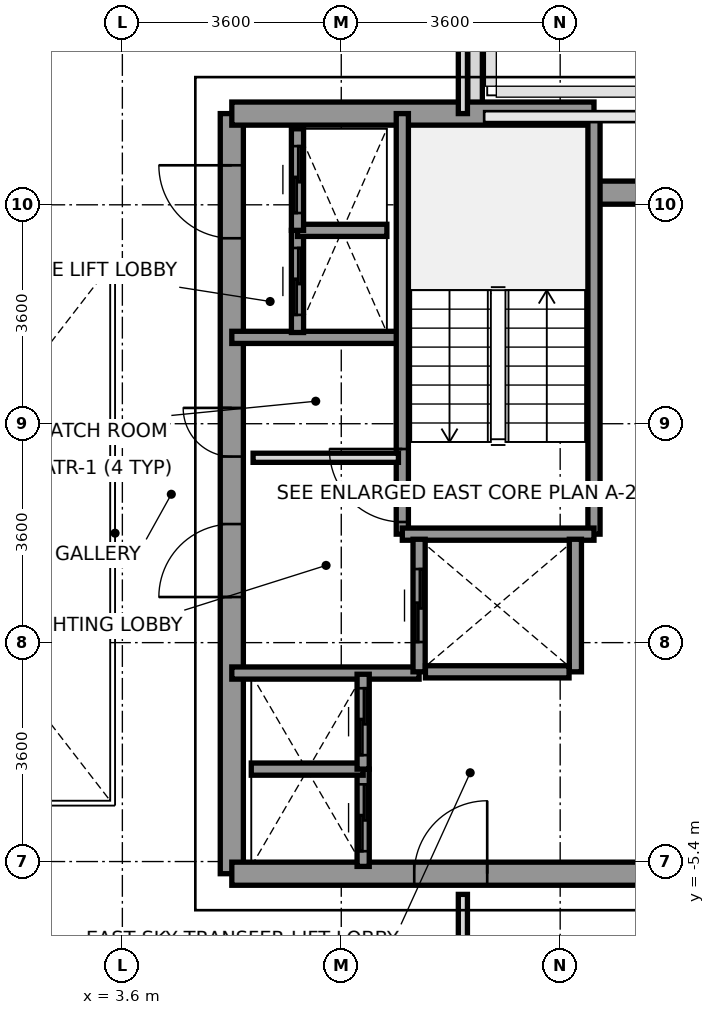
"""IFC4 building model, lengths in metres.
Left out: names, types, materials, properties, quantities, classifications, styles, units other than length and angle.
Written with IfcOpenShell. Run it as: python <this file> out.ifc"""

import sys

from ifc_helpers import new_model, si_unit, direction, frame, frame_2d, origin, place, context, subcontext, project, spatial, rectangle, extrude, source, transform, mapped, element, fill, save


model = new_model("IFC4")
c1 = context("Model", 3, precision=1e-05, world=origin(), true_north=direction((0.0, 1.0)))
c2 = subcontext(c1, "Body", "Model", "MODEL_VIEW")
j1 = project(units=[si_unit("LENGTHUNIT", "METRE"), si_unit("PLANEANGLEUNIT", "RADIAN")], contexts=[c1])
p1 = place(None, origin())
s1 = spatial("IfcSite", under=j1, at=p1, CompositionType="ELEMENT")
p2 = place(p1, origin())
s2 = spatial("IfcBuilding", under=s1, at=p2, CompositionType="ELEMENT")
p3 = place(p2, frame((0.0, 0.0, 177.4)))
s3 = spatial("IfcBuildingStorey", under=s2, at=p3, CompositionType="ELEMENT", Elevation=177.4)
p4 = place(p3, frame((9.4, 8.547, 0.0), z_axis=(0.0, 0.0, 1.0), x_axis=(0.0, -1.0, 0.0)))
e1 = element("IfcWall", 1, at=p4, inside=s3, PredefinedType="PARAPET", context=c2, shape_type="SweptSolid", body=[
    extrude(rectangle(XDim=1.594, YDim=0.24, at=frame_2d((0.797, 0.0))), origin(), (0.0, 0.0, 1.0), 1.15),
])
p5 = place(p3, frame((5.4, -5.6, 0.0), z_axis=(0.0, 0.0, 1.0), x_axis=(0.0, 1.0, 0.0)))
e2 = element("IfcWall", 2, at=p5, inside=s3, PredefinedType="SHEAR", context=c2, shape_type="SweptSolid", body=[
    extrude(rectangle(XDim=12.5, YDim=0.38, at=frame_2d((6.25, 0.0))), origin(), (0.0, 0.0, 1.0), 3.2),
])
p6 = place(p5, frame((4.55, 0.0, 0.0)))
e3 = element("IfcOpeningElement", 3, at=p6, cuts=e2, PredefinedType="OPENING", context=c2, shape_type="SweptSolid", body=[
    extrude(rectangle(XDim=1.2, YDim=2.2, at=frame_2d((0.6, 1.1))), frame((0.0, 0.2, 0.0), z_axis=(0.0, -1.0, 0.0), x_axis=(1.0, 0.0, 0.0)), (0.0, 0.0, 1.0), 0.4),
])
p7 = place(p5, frame((10.45, 0.0, 0.0)))
e4 = element("IfcOpeningElement", 4, at=p7, cuts=e2, PredefinedType="OPENING", context=c2, shape_type="SweptSolid", body=[
    extrude(rectangle(XDim=1.2, YDim=2.2, at=frame_2d((0.6, 1.1))), frame((0.0, 0.2, 0.0), z_axis=(0.0, -1.0, 0.0), x_axis=(1.0, 0.0, 0.0)), (0.0, 0.0, 1.0), 0.4),
])
p8 = place(p5, frame((6.86, 0.0, 0.0)))
e5 = element("IfcOpeningElement", 5, at=p8, cuts=e2, PredefinedType="OPENING", context=c2, shape_type="SweptSolid", body=[
    extrude(rectangle(XDim=0.8, YDim=2.1, at=frame_2d((0.4, 1.05))), frame((0.0, 0.2, 0.0), z_axis=(0.0, -1.0, 0.0), x_axis=(1.0, 0.0, 0.0)), (0.0, 0.0, 1.0), 0.4),
])
p9 = place(p3, frame((5.4, 6.9, 0.0), z_axis=(0.0, 0.0, 1.0), x_axis=(1.0, 0.0, 0.0)))
e6 = element("IfcWall", 6, at=p9, inside=s3, PredefinedType="SHEAR", context=c2, shape_type="SweptSolid", body=[
    extrude(rectangle(XDim=5.956, YDim=0.38, at=frame_2d((2.978, 0.0))), origin(), (0.0, 0.0, 1.0), 3.2),
])
p10 = place(p3, frame((11.356, 5.6, 0.0), z_axis=(0.0, 0.0, 1.0), x_axis=(1.0, 0.0, 0.0)))
e7 = element("IfcWall", 7, at=p10, inside=s3, PredefinedType="SHEAR", context=c2, shape_type="SweptSolid", body=[
    extrude(rectangle(XDim=1.844, YDim=0.38, at=frame_2d((0.922, 0.0))), origin(), (0.0, 0.0, 1.0), 3.2),
])
p11 = place(p3, frame((5.4, -5.6, 0.0), z_axis=(0.0, 0.0, 1.0), x_axis=(1.0, 0.0, 0.0)))
e8 = element("IfcWall", 8, at=p11, inside=s3, PredefinedType="SHEAR", context=c2, shape_type="SweptSolid", body=[
    extrude(rectangle(XDim=7.8, YDim=0.38, at=frame_2d((3.9, 0.0))), origin(), (0.0, 0.0, 1.0), 3.2),
])
p12 = place(p11, frame((3.0, 0.0, 0.0)))
e9 = element("IfcOpeningElement", 9, at=p12, cuts=e8, PredefinedType="OPENING", context=c2, shape_type="SweptSolid", body=[
    extrude(rectangle(XDim=1.2, YDim=2.2, at=frame_2d((0.6, 1.1))), frame((0.0, 0.2, 0.0), z_axis=(0.0, -1.0, 0.0), x_axis=(1.0, 0.0, 0.0)), (0.0, 0.0, 1.0), 0.4),
])
p13 = place(p3, frame((5.4, 3.22, 0.0), z_axis=(0.0, 0.0, 1.0), x_axis=(1.0, 0.0, 0.0)))
e10 = element("IfcWall", 10, at=p13, inside=s3, PredefinedType="SOLIDWALL", context=c2, shape_type="SweptSolid", body=[
    extrude(rectangle(XDim=2.78, YDim=0.2, at=frame_2d((1.39, 0.0))), origin(), (0.0, 0.0, 1.0), 3.2),
])
p14 = place(p3, frame((5.4, -2.3, 0.0), z_axis=(0.0, 0.0, 1.0), x_axis=(1.0, 0.0, 0.0)))
e11 = element("IfcWall", 11, at=p14, inside=s3, PredefinedType="SOLIDWALL", context=c2, shape_type="SweptSolid", body=[
    extrude(rectangle(XDim=3.08, YDim=0.2, at=frame_2d((1.54, 0.0))), origin(), (0.0, 0.0, 1.0), 3.2),
])
p15 = place(p3, frame((8.204, -0.016, 0.0), z_axis=(0.0, 0.0, 1.0), x_axis=(0.0, 1.0, 0.0)))
e12 = element("IfcWall", 12, at=p15, inside=s3, PredefinedType="SOLIDWALL", context=c2, shape_type="SweptSolid", body=[
    extrude(rectangle(XDim=6.916, YDim=0.2, at=frame_2d((3.458, 0.0))), origin(), (0.0, 0.0, 1.0), 3.2),
])
p16 = place(p15, frame((0.2, 0.0, 0.0)))
e13 = element("IfcOpeningElement", 13, at=p16, cuts=e12, PredefinedType="OPENING", context=c2, shape_type="SweptSolid", body=[
    extrude(rectangle(XDim=1.2, YDim=2.2, at=frame_2d((0.6, 1.1))), frame((0.0, 0.11, 0.0), z_axis=(0.0, -1.0, 0.0), x_axis=(1.0, 0.0, 0.0)), (0.0, 0.0, 1.0), 0.22),
])
p17 = place(p3, frame((11.356, -0.016, 0.0), z_axis=(0.0, 0.0, 1.0), x_axis=(0.0, 1.0, 0.0)))
e14 = element("IfcWall", 14, at=p17, inside=s3, PredefinedType="SOLIDWALL", context=c2, shape_type="SweptSolid", body=[
    extrude(rectangle(XDim=6.916, YDim=0.2, at=frame_2d((3.458, 0.0))), origin(), (0.0, 0.0, 1.0), 3.2),
])
p18 = place(p3, frame((8.204, -0.016, 0.0), z_axis=(0.0, 0.0, 1.0), x_axis=(1.0, 0.0, 0.0)))
e15 = element("IfcWall", 15, at=p18, inside=s3, PredefinedType="SOLIDWALL", context=c2, shape_type="SweptSolid", body=[
    extrude(rectangle(XDim=3.152, YDim=0.2, at=frame_2d((1.576, 0.0))), origin(), (0.0, 0.0, 1.0), 3.2),
])
p19 = place(p3, frame((8.48, -2.28, 0.0), z_axis=(0.0, 0.0, 1.0), x_axis=(0.0, 1.0, 0.0)))
e16 = element("IfcWall", 16, at=p19, inside=s3, PredefinedType="SOLIDWALL", context=c2, shape_type="SweptSolid", body=[
    extrude(rectangle(XDim=2.18, YDim=0.2, at=frame_2d((1.09, 0.0))), origin(), (0.0, 0.0, 1.0), 3.2),
])
p20 = place(p19, frame((0.49, 0.0, 0.0)))
e17 = element("IfcOpeningElement", 17, at=p20, cuts=e16, PredefinedType="OPENING", context=c2, shape_type="SweptSolid", body=[
    extrude(rectangle(XDim=1.2, YDim=2.2, at=frame_2d((0.6, 1.1))), frame((0.0, 0.11, 0.0), z_axis=(0.0, -1.0, 0.0), x_axis=(1.0, 0.0, 0.0)), (0.0, 0.0, 1.0), 0.22),
])
p21 = place(p3, frame((11.05, -2.28, 0.0), z_axis=(0.0, 0.0, 1.0), x_axis=(0.0, 1.0, 0.0)))
e18 = element("IfcWall", 18, at=p21, inside=s3, PredefinedType="SOLIDWALL", context=c2, shape_type="SweptSolid", body=[
    extrude(rectangle(XDim=2.18, YDim=0.2, at=frame_2d((1.09, 0.0))), origin(), (0.0, 0.0, 1.0), 3.2),
])
p22 = place(p3, frame((8.584, -2.28, 0.0), z_axis=(0.0, 0.0, 1.0), x_axis=(1.0, 0.0, 0.0)))
e19 = element("IfcWall", 19, at=p22, inside=s3, PredefinedType="SOLIDWALL", context=c2, shape_type="SweptSolid", body=[
    extrude(rectangle(XDim=2.362, YDim=0.2, at=frame_2d((1.181, 0.0))), origin(), (0.0, 0.0, 1.0), 3.2),
])
p23 = place(p3, frame((7.56, -5.48, 0.0), z_axis=(0.0, 0.0, 1.0), x_axis=(0.0, 1.0, 0.0)))
e20 = element("IfcWall", 20, at=p23, inside=s3, PredefinedType="SOLIDWALL", context=c2, shape_type="SweptSolid", body=[
    extrude(rectangle(XDim=1.6, YDim=0.2, at=frame_2d((0.8, 0.0))), origin(), (0.0, 0.0, 1.0), 3.2),
])
p24 = place(p23, frame((0.25, 0.0, 0.0)))
e21 = element("IfcOpeningElement", 21, at=p24, cuts=e20, PredefinedType="OPENING", context=c2, shape_type="SweptSolid", body=[
    extrude(rectangle(XDim=1.1, YDim=2.2, at=frame_2d((0.55, 1.1))), frame((0.0, 0.11, 0.0), z_axis=(0.0, -1.0, 0.0), x_axis=(1.0, 0.0, 0.0)), (0.0, 0.0, 1.0), 0.22),
])
p25 = place(p3, frame((5.72, -3.88, 0.0), z_axis=(0.0, 0.0, 1.0), x_axis=(1.0, 0.0, 0.0)))
e22 = element("IfcWall", 22, at=p25, inside=s3, PredefinedType="SOLIDWALL", context=c2, shape_type="SweptSolid", body=[
    extrude(rectangle(XDim=1.84, YDim=0.2, at=frame_2d((0.92, 0.0))), origin(), (0.0, 0.0, 1.0), 3.2),
])
p26 = place(p3, frame((7.56, -3.88, 0.0), z_axis=(0.0, 0.0, 1.0), x_axis=(0.0, 1.0, 0.0)))
e23 = element("IfcWall", 23, at=p26, inside=s3, PredefinedType="SOLIDWALL", context=c2, shape_type="SweptSolid", body=[
    extrude(rectangle(XDim=1.56, YDim=0.2, at=frame_2d((0.78, 0.0))), origin(), (0.0, 0.0, 1.0), 3.2),
])
p27 = place(p26, frame((0.23, 0.0, 0.0)))
e24 = element("IfcOpeningElement", 24, at=p27, cuts=e23, PredefinedType="OPENING", context=c2, shape_type="SweptSolid", body=[
    extrude(rectangle(XDim=1.1, YDim=2.2, at=frame_2d((0.55, 1.1))), frame((0.0, 0.11, 0.0), z_axis=(0.0, -1.0, 0.0), x_axis=(1.0, 0.0, 0.0)), (0.0, 0.0, 1.0), 0.22),
])
p28 = place(p3, frame((6.48, 3.3, 0.0), z_axis=(0.0, 0.0, 1.0), x_axis=(0.0, 1.0, 0.0)))
e25 = element("IfcWall", 25, at=p28, inside=s3, PredefinedType="SOLIDWALL", context=c2, shape_type="SweptSolid", body=[
    extrude(rectangle(XDim=1.68, YDim=0.2, at=frame_2d((0.84, 0.0))), origin(), (0.0, 0.0, 1.0), 3.2),
])
p29 = place(p28, frame((0.29, 0.0, 0.0)))
e26 = element("IfcOpeningElement", 26, at=p29, cuts=e25, PredefinedType="OPENING", context=c2, shape_type="SweptSolid", body=[
    extrude(rectangle(XDim=1.1, YDim=2.2, at=frame_2d((0.55, 1.1))), frame((0.0, 0.11, 0.0), z_axis=(0.0, -1.0, 0.0), x_axis=(1.0, 0.0, 0.0)), (0.0, 0.0, 1.0), 0.22),
])
p30 = place(p3, frame((6.48, 4.98, 0.0), z_axis=(0.0, 0.0, 1.0), x_axis=(1.0, 0.0, 0.0)))
e27 = element("IfcWall", 27, at=p30, inside=s3, PredefinedType="SOLIDWALL", context=c2, shape_type="SweptSolid", body=[
    extrude(rectangle(XDim=1.47, YDim=0.2, at=frame_2d((0.735, 0.0))), origin(), (0.0, 0.0, 1.0), 3.2),
])
p31 = place(p3, frame((6.48, 4.98, 0.0), z_axis=(0.0, 0.0, 1.0), x_axis=(0.0, 1.0, 0.0)))
e28 = element("IfcWall", 28, at=p31, inside=s3, PredefinedType="SOLIDWALL", context=c2, shape_type="SweptSolid", body=[
    extrude(rectangle(XDim=1.67, YDim=0.2, at=frame_2d((0.835, 0.0))), origin(), (0.0, 0.0, 1.0), 3.2),
])
p32 = place(p31, frame((0.285, 0.0, 0.0)))
e29 = element("IfcOpeningElement", 29, at=p32, cuts=e28, PredefinedType="OPENING", context=c2, shape_type="SweptSolid", body=[
    extrude(rectangle(XDim=1.1, YDim=2.2, at=frame_2d((0.55, 1.1))), frame((0.0, 0.11, 0.0), z_axis=(0.0, -1.0, 0.0), x_axis=(1.0, 0.0, 0.0)), (0.0, 0.0, 1.0), 0.22),
])
p33 = place(p3, frame((5.75, 1.24, 0.0), z_axis=(0.0, 0.0, 1.0), x_axis=(1.0, 0.0, 0.0)))
e30 = element("IfcWall", 30, at=p33, inside=s3, PredefinedType="PARTITIONING", context=c2, shape_type="SweptSolid", body=[
    extrude(rectangle(XDim=2.39, YDim=0.15, at=frame_2d((1.195, 0.0))), origin(), (0.0, 0.0, 1.0), 2.3),
])
p34 = place(p3, frame((9.2, 6.9, 0.0), z_axis=(0.0, 0.0, 1.0), x_axis=(0.0, 1.0, 0.0)))
e31 = element("IfcWall", 31, at=p34, inside=s3, PredefinedType="PARTITIONING", context=c2, shape_type="SweptSolid", body=[
    extrude(rectangle(XDim=8.78, YDim=0.15, at=frame_2d((4.39, 0.0))), origin(), (0.0, 0.0, 1.0), 2.75),
])
p35 = place(p3, frame((9.2, -15.68, 0.0), z_axis=(0.0, 0.0, 1.0), x_axis=(0.0, 1.0, 0.0)))
e32 = element("IfcWall", 32, at=p35, inside=s3, PredefinedType="PARTITIONING", context=c2, shape_type="SweptSolid", body=[
    extrude(rectangle(XDim=9.74, YDim=0.15, at=frame_2d((4.87, 0.0))), origin(), (0.0, 0.0, 1.0), 2.75),
])
m1 = source(origin(), c2, "Body", "SweptSolid", [
    extrude(rectangle(XDim=1.2, YDim=2.2, at=frame_2d((0.6, 1.1))), frame((0.0, 0.025, 0.0), z_axis=(0.0, -1.0, 0.0), x_axis=(1.0, 0.0, 0.0)), (0.0, 0.0, 1.0), 0.05),
])
p36 = place(p16, origin())
e33 = element("IfcDoor", 33, at=p36, inside=s3, OperationType="SINGLE_SWING_RIGHT", PredefinedType="DOOR", context=c2, shape_type="MappedRepresentation", body=[
    mapped(m1, transform((0.0, 0.0, 0.0), x_axis=(1.0, 0.0, 0.0), y_axis=(0.0, 1.0, 0.0), z_axis=(0.0, 0.0, 1.0), scale=1.0)),
])
fill(e13, e33)
p37 = place(p6, origin())
e34 = element("IfcDoor", 34, at=p37, inside=s3, OperationType="SINGLE_SWING_LEFT", PredefinedType="DOOR", context=c2, shape_type="MappedRepresentation", body=[
    mapped(m1, transform((0.0, 0.0, 0.0), x_axis=(1.0, 0.0, 0.0), y_axis=(0.0, 1.0, 0.0), z_axis=(0.0, 0.0, 1.0), scale=1.0)),
])
fill(e3, e34)
p38 = place(p7, origin())
e35 = element("IfcDoor", 35, at=p38, inside=s3, OperationType="SINGLE_SWING_RIGHT", PredefinedType="DOOR", context=c2, shape_type="MappedRepresentation", body=[
    mapped(m1, transform((0.0, 0.0, 0.0), x_axis=(1.0, 0.0, 0.0), y_axis=(0.0, 1.0, 0.0), z_axis=(0.0, 0.0, 1.0), scale=1.0)),
])
fill(e4, e35)
p39 = place(p12, origin())
e36 = element("IfcDoor", 36, at=p39, inside=s3, OperationType="SINGLE_SWING_RIGHT", PredefinedType="DOOR", context=c2, shape_type="MappedRepresentation", body=[
    mapped(m1, transform((0.0, 0.0, 0.0), x_axis=(1.0, 0.0, 0.0), y_axis=(0.0, 1.0, 0.0), z_axis=(0.0, 0.0, 1.0), scale=1.0)),
])
fill(e9, e36)
m2 = source(origin(), c2, "Body", "SweptSolid", [
    extrude(rectangle(XDim=0.8, YDim=2.1, at=frame_2d((0.4, 1.05))), frame((0.0, 0.025, 0.0), z_axis=(0.0, -1.0, 0.0), x_axis=(1.0, 0.0, 0.0)), (0.0, 0.0, 1.0), 0.05),
])
p40 = place(p8, origin())
e37 = element("IfcDoor", 37, at=p40, inside=s3, OperationType="SINGLE_SWING_RIGHT", PredefinedType="DOOR", context=c2, shape_type="MappedRepresentation", body=[
    mapped(m2, transform((0.0, 0.0, 0.0), x_axis=(1.0, 0.0, 0.0), y_axis=(0.0, 1.0, 0.0), z_axis=(0.0, 0.0, 1.0), scale=1.0)),
])
fill(e5, e37)
p41 = place(p20, origin())
e38 = element("IfcDoor", 38, at=p41, inside=s3, OperationType="SLIDING_TO_RIGHT", PredefinedType="DOOR", context=c2, shape_type="MappedRepresentation", body=[
    mapped(m1, transform((0.0, 0.0, 0.0), x_axis=(1.0, 0.0, 0.0), y_axis=(0.0, 1.0, 0.0), z_axis=(0.0, 0.0, 1.0), scale=1.0)),
])
fill(e17, e38)
m3 = source(origin(), c2, "Body", "SweptSolid", [
    extrude(rectangle(XDim=1.1, YDim=2.2, at=frame_2d((0.55, 1.1))), frame((0.0, 0.025, 0.0), z_axis=(0.0, -1.0, 0.0), x_axis=(1.0, 0.0, 0.0)), (0.0, 0.0, 1.0), 0.05),
])
p42 = place(p24, origin())
e39 = element("IfcDoor", 39, at=p42, inside=s3, OperationType="SLIDING_TO_LEFT", PredefinedType="DOOR", context=c2, shape_type="MappedRepresentation", body=[
    mapped(m3, transform((0.0, 0.0, 0.0), x_axis=(1.0, 0.0, 0.0), y_axis=(0.0, 1.0, 0.0), z_axis=(0.0, 0.0, 1.0), scale=1.0)),
])
fill(e21, e39)
p43 = place(p27, origin())
e40 = element("IfcDoor", 40, at=p43, inside=s3, OperationType="SLIDING_TO_LEFT", PredefinedType="DOOR", context=c2, shape_type="MappedRepresentation", body=[
    mapped(m3, transform((0.0, 0.0, 0.0), x_axis=(1.0, 0.0, 0.0), y_axis=(0.0, 1.0, 0.0), z_axis=(0.0, 0.0, 1.0), scale=1.0)),
])
fill(e24, e40)
p44 = place(p29, origin())
e41 = element("IfcDoor", 41, at=p44, inside=s3, OperationType="SLIDING_TO_LEFT", PredefinedType="DOOR", context=c2, shape_type="MappedRepresentation", body=[
    mapped(m3, transform((0.0, 0.0, 0.0), x_axis=(1.0, 0.0, 0.0), y_axis=(0.0, 1.0, 0.0), z_axis=(0.0, 0.0, 1.0), scale=1.0)),
])
fill(e26, e41)
p45 = place(p32, origin())
e42 = element("IfcDoor", 42, at=p45, inside=s3, OperationType="SLIDING_TO_LEFT", PredefinedType="DOOR", context=c2, shape_type="MappedRepresentation", body=[
    mapped(m3, transform((0.0, 0.0, 0.0), x_axis=(1.0, 0.0, 0.0), y_axis=(0.0, 1.0, 0.0), z_axis=(0.0, 0.0, 1.0), scale=1.0)),
])
fill(e29, e42)
save(model, sys.argv[1])
